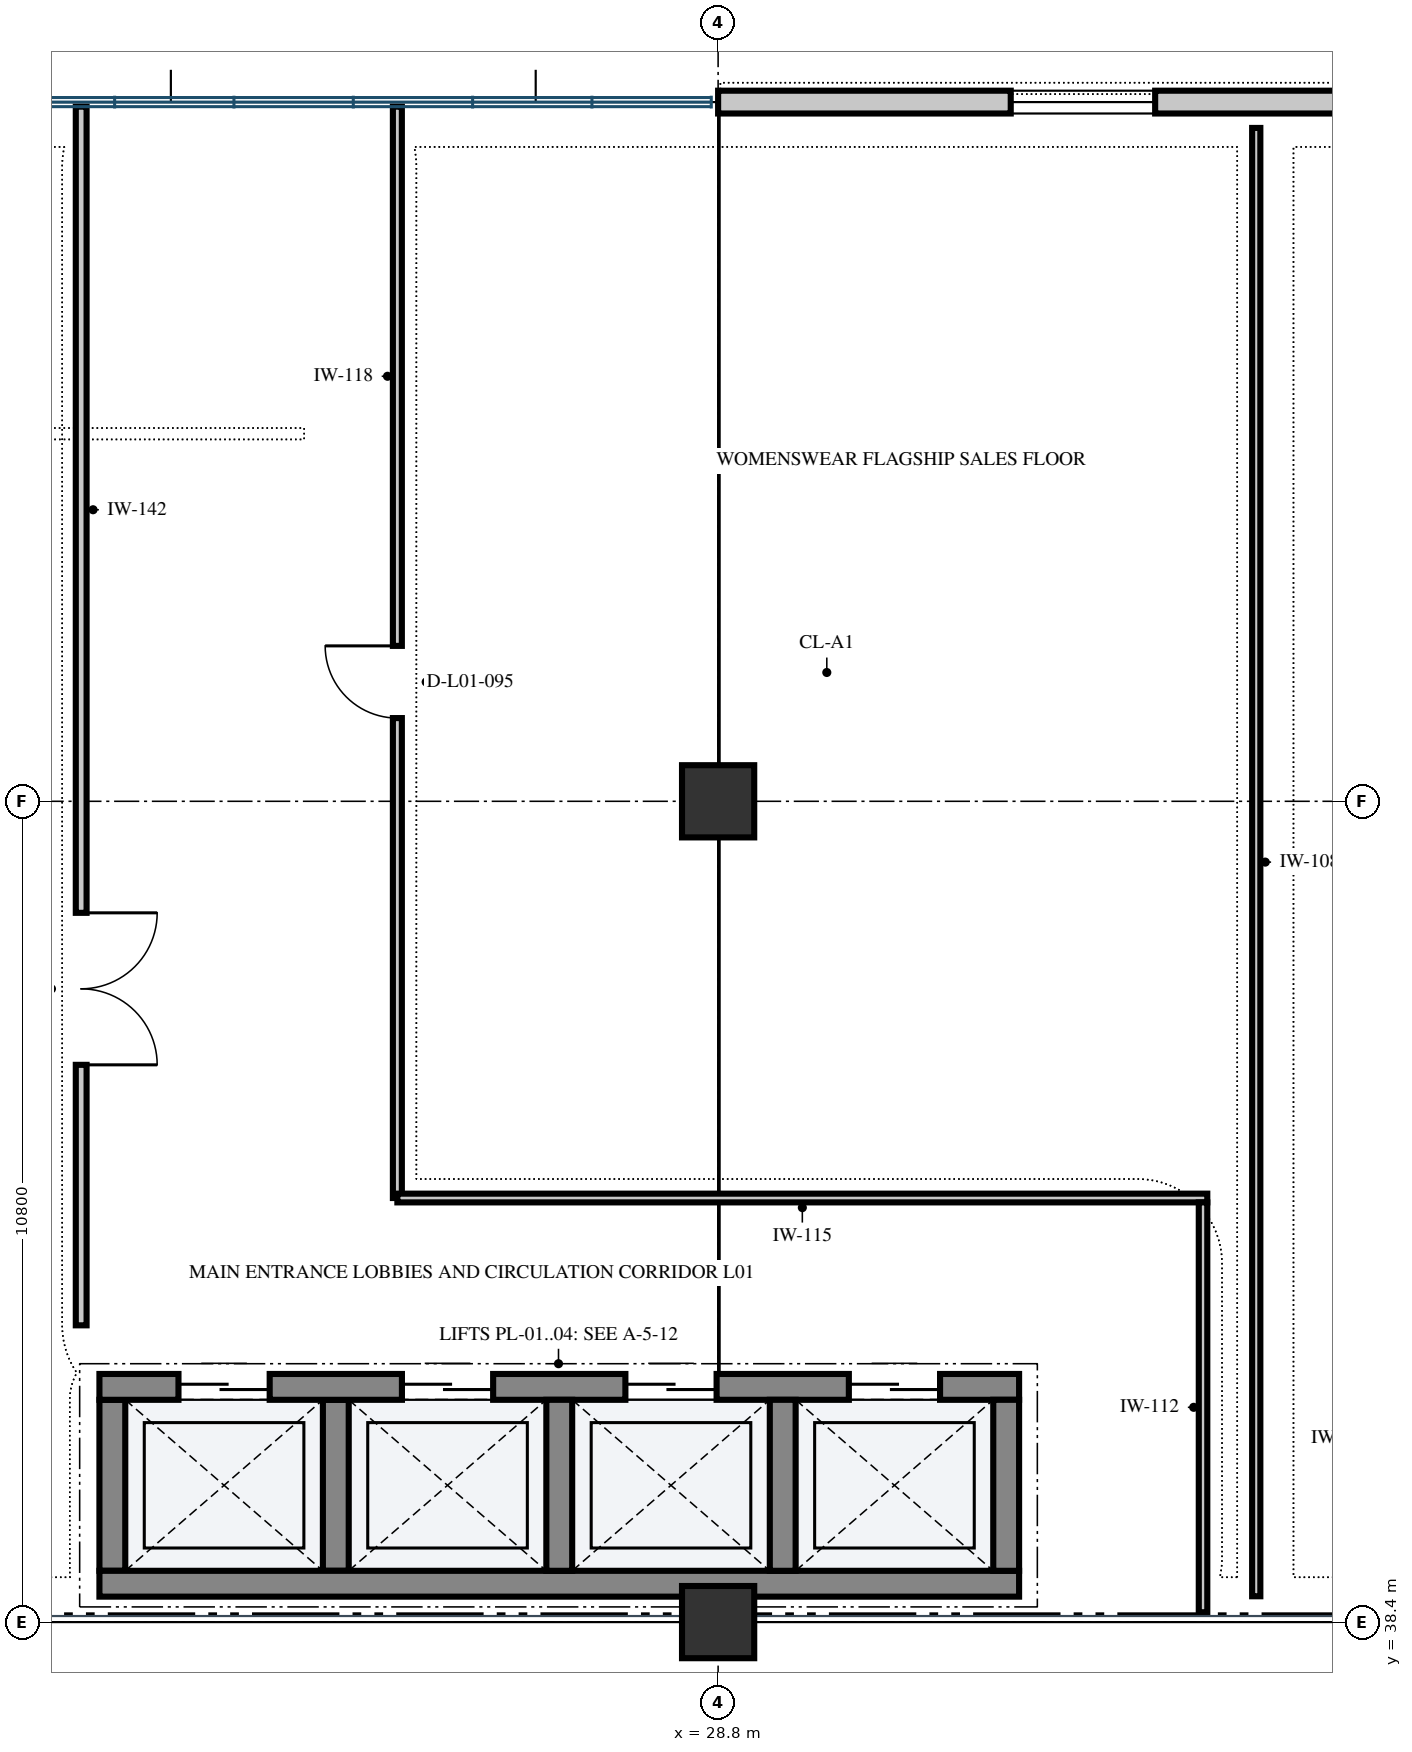
"""IFC4 building model, lengths in metres.
Left out: names, types, materials, properties, quantities, classifications, styles, units other than length and angle.
Written with IfcOpenShell. Run it as: python <this file> out.ifc"""

import sys

from ifc_helpers import new_model, si_unit, direction, frame, frame_2d, origin, origin_2d, place, context, subcontext, project, spatial, rectangle, extrude, element, fill, save


model = new_model("IFC4")
c1 = context("Model", 3, precision=1e-05, world=origin(), true_north=direction((0.0, 1.0)))
c2 = subcontext(c1, "Body", "Model", "MODEL_VIEW")
j1 = project(units=[si_unit("LENGTHUNIT", "METRE"), si_unit("PLANEANGLEUNIT", "RADIAN")], contexts=[c1])
p1 = place(None, origin())
s1 = spatial("IfcSite", under=j1, at=p1, CompositionType="ELEMENT")
p2 = place(p1, origin())
s2 = spatial("IfcBuilding", under=s1, at=p2, CompositionType="ELEMENT")
p3 = place(p2, frame((0.0, 0.0, 5.4)))
s3 = spatial("IfcBuildingStorey", under=s2, at=p3, CompositionType="ELEMENT", Elevation=5.4)
for number, where, z_axis, x_axis in (
    (1, (28.8, 38.4, 0.0), (0.0, 0.0, 1.0), (1.0, 0.0, 0.0)),
    (2, (28.8, 49.2, 0.0), (0.0, 0.0, 1.0), (1.0, 0.0, 0.0)),
):
    element("IfcColumn", number, at=place(p3, frame(where, z_axis=z_axis, x_axis=x_axis)), inside=s3, PredefinedType="COLUMN", context=c2, shape_type="SweptSolid", body=[
        extrude(rectangle(XDim=0.95, YDim=0.95, at=origin_2d()), origin(), (0.0, 0.0, 1.0), 4.8),
    ])
p4 = place(p3, frame((28.8, 58.4, 0.0), z_axis=(0.0, 0.0, 1.0), x_axis=(1.0, 0.0, 0.0)))
e3 = element("IfcWall", 3, at=p4, inside=s3, PredefinedType="SOLIDWALL", context=c2, shape_type="SweptSolid", body=[
    extrude(rectangle(XDim=9.6, YDim=0.3, at=frame_2d((4.8, 0.0))), origin(), (0.0, 0.0, 1.0), 3.445),
])
p5 = place(p4, frame((3.85, 0.0, 1.1)))
e4 = element("IfcOpeningElement", 4, at=p5, cuts=e3, PredefinedType="OPENING", context=c2, shape_type="SweptSolid", body=[
    extrude(rectangle(XDim=1.9, YDim=1.85, at=frame_2d((0.95, 0.925))), frame((0.0, 0.162, 0.0), z_axis=(0.0, -1.0, 0.0), x_axis=(1.0, 0.0, 0.0)), (0.0, 0.0, 1.0), 0.324),
])
for number, where, z_axis, x_axis in (
    (5, (23.77, 39.075, 0.0), (0.0, 0.0, 1.0), (0.0, 1.0, 0.0)),
    (6, (20.83, 39.075, 0.0), (0.0, 0.0, 1.0), (0.0, 1.0, 0.0)),
):
    element("IfcWall", number, at=place(p3, frame(where, z_axis=z_axis, x_axis=x_axis)), inside=s3, PredefinedType="SHEAR", context=c2, shape_type="SweptSolid", body=[
        extrude(rectangle(XDim=2.25, YDim=0.34, at=frame_2d((1.125, 0.0))), origin(), (0.0, 0.0, 1.0), 4.505),
    ])
p6 = place(p3, frame((20.66, 38.905, 0.0), z_axis=(0.0, 0.0, 1.0), x_axis=(1.0, 0.0, 0.0)))
e7 = element("IfcWall", 7, at=p6, inside=s3, PredefinedType="SHEAR", context=c2, shape_type="SweptSolid", body=[
    extrude(rectangle(XDim=12.1, YDim=0.34, at=frame_2d((6.05, 0.0))), origin(), (0.0, 0.0, 1.0), 4.505),
])
p7 = place(p3, frame((20.66, 41.495, 0.0), z_axis=(0.0, 0.0, 1.0), x_axis=(1.0, 0.0, 0.0)))
e8 = element("IfcWall", 8, at=p7, inside=s3, PredefinedType="SHEAR", context=c2, shape_type="SweptSolid", body=[
    extrude(rectangle(XDim=12.1, YDim=0.34, at=frame_2d((6.05, 0.0))), origin(), (0.0, 0.0, 1.0), 4.505),
])
p8 = place(p7, frame((1.04, 0.0, 0.0)))
e9 = element("IfcOpeningElement", 9, at=p8, cuts=e8, PredefinedType="OPENING", context=c2, shape_type="SweptSolid", body=[
    extrude(rectangle(XDim=1.2, YDim=2.2, at=frame_2d((0.6, 1.1))), frame((0.0, 0.182, 0.0), z_axis=(0.0, -1.0, 0.0), x_axis=(1.0, 0.0, 0.0)), (0.0, 0.0, 1.0), 0.364),
])
p9 = place(p7, frame((3.98, 0.0, 0.0)))
e10 = element("IfcOpeningElement", 10, at=p9, cuts=e8, PredefinedType="OPENING", context=c2, shape_type="SweptSolid", body=[
    extrude(rectangle(XDim=1.2, YDim=2.2, at=frame_2d((0.6, 1.1))), frame((0.0, 0.182, 0.0), z_axis=(0.0, -1.0, 0.0), x_axis=(1.0, 0.0, 0.0)), (0.0, 0.0, 1.0), 0.364),
])
p10 = place(p7, frame((6.92, 0.0, 0.0)))
e11 = element("IfcOpeningElement", 11, at=p10, cuts=e8, PredefinedType="OPENING", context=c2, shape_type="SweptSolid", body=[
    extrude(rectangle(XDim=1.2, YDim=2.2, at=frame_2d((0.6, 1.1))), frame((0.0, 0.182, 0.0), z_axis=(0.0, -1.0, 0.0), x_axis=(1.0, 0.0, 0.0)), (0.0, 0.0, 1.0), 0.364),
])
p11 = place(p7, frame((9.86, 0.0, 0.0)))
e12 = element("IfcOpeningElement", 12, at=p11, cuts=e8, PredefinedType="OPENING", context=c2, shape_type="SweptSolid", body=[
    extrude(rectangle(XDim=1.2, YDim=2.2, at=frame_2d((0.6, 1.1))), frame((0.0, 0.182, 0.0), z_axis=(0.0, -1.0, 0.0), x_axis=(1.0, 0.0, 0.0)), (0.0, 0.0, 1.0), 0.364),
])
for number, where, z_axis, x_axis in (
    (13, (26.71, 39.075, 0.0), (0.0, 0.0, 1.0), (0.0, 1.0, 0.0)),
    (14, (29.65, 39.075, 0.0), (0.0, 0.0, 1.0), (0.0, 1.0, 0.0)),
    (15, (32.59, 39.075, 0.0), (0.0, 0.0, 1.0), (0.0, 1.0, 0.0)),
):
    element("IfcWall", number, at=place(p3, frame(where, z_axis=z_axis, x_axis=x_axis)), inside=s3, PredefinedType="SHEAR", context=c2, shape_type="SweptSolid", body=[
        extrude(rectangle(XDim=2.25, YDim=0.34, at=frame_2d((1.125, 0.0))), origin(), (0.0, 0.0, 1.0), 4.505),
    ])
p12 = place(p3, frame((20.42, 58.34, 0.0), z_axis=(0.0, 0.0, 1.0), x_axis=(0.0, -1.0, 0.0)))
e16 = element("IfcWall", 16, at=p12, inside=s3, PredefinedType="PARTITIONING", context=c2, shape_type="SweptSolid", body=[
    extrude(rectangle(XDim=16.035, YDim=0.142, at=frame_2d((8.018, 0.0))), origin(), (0.0, 0.0, 1.0), 3.445),
])
p13 = place(p12, frame((10.607, 0.0, 0.0)))
e17 = element("IfcOpeningElement", 17, at=p13, cuts=e16, PredefinedType="OPENING", context=c2, shape_type="SweptSolid", body=[
    extrude(rectangle(XDim=2.0, YDim=2.4, at=frame_2d((1.0, 1.2))), frame((0.0, 0.083, 0.0), z_axis=(0.0, -1.0, 0.0), x_axis=(1.0, 0.0, 0.0)), (0.0, 0.0, 1.0), 0.166),
])
p14 = place(p3, frame((24.58, 43.98, 0.0), z_axis=(0.0, 0.0, 1.0), x_axis=(0.0, 1.0, 0.0)))
e18 = element("IfcWall", 18, at=p14, inside=s3, PredefinedType="PARTITIONING", context=c2, shape_type="SweptSolid", body=[
    extrude(rectangle(XDim=14.36, YDim=0.118, at=frame_2d((7.18, 0.0))), origin(), (0.0, 0.0, 1.0), 3.445),
])
p15 = place(p14, frame((6.315, 0.0, 0.0)))
e19 = element("IfcOpeningElement", 19, at=p15, cuts=e18, PredefinedType="OPENING", context=c2, shape_type="SweptSolid", body=[
    extrude(rectangle(XDim=0.95, YDim=2.1, at=frame_2d((0.475, 1.05))), frame((0.0, 0.071, 0.0), z_axis=(0.0, -1.0, 0.0), x_axis=(1.0, 0.0, 0.0)), (0.0, 0.0, 1.0), 0.142),
])
p16 = place(p3, frame((35.236, 43.98, 0.0), z_axis=(0.0, 0.0, 1.0), x_axis=(-1.0, 0.0, 0.0)))
e20 = element("IfcWall", 20, at=p16, inside=s3, PredefinedType="PARTITIONING", context=c2, shape_type="SweptSolid", body=[
    extrude(rectangle(XDim=10.656, YDim=0.115, at=frame_2d((5.328, 0.0))), origin(), (0.0, 0.0, 1.0), 4.505),
])
p17 = place(p3, frame((35.18, 38.53, 0.0), z_axis=(0.0, 0.0, 1.0), x_axis=(0.0, 1.0, 0.0)))
e21 = element("IfcWall", 21, at=p17, inside=s3, PredefinedType="PARTITIONING", context=c2, shape_type="SweptSolid", body=[
    extrude(rectangle(XDim=5.393, YDim=0.112, at=frame_2d((2.696, 0.0))), origin(), (0.0, 0.0, 1.0), 4.505),
])
p18 = place(p3, frame((35.88, 58.06, 0.0), z_axis=(0.0, 0.0, 1.0), x_axis=(0.0, -1.0, 0.0)))
e22 = element("IfcWall", 22, at=p18, inside=s3, PredefinedType="PARTITIONING", context=c2, shape_type="SweptSolid", body=[
    extrude(rectangle(XDim=19.32, YDim=0.108, at=frame_2d((9.66, 0.0))), origin(), (0.0, 0.0, 1.0), 3.445),
])
p19 = place(p5, origin())
e23 = element("IfcWindow", 23, at=p19, inside=s3, PartitioningType="SINGLE_PANEL", PredefinedType="WINDOW", context=c2, shape_type="SweptSolid", body=[
    extrude(rectangle(XDim=1.9, YDim=1.85, at=frame_2d((0.95, 0.925))), frame((0.0, 0.03, 0.0), z_axis=(0.0, -1.0, 0.0), x_axis=(1.0, 0.0, 0.0)), (0.0, 0.0, 1.0), 0.06),
])
fill(e4, e23)
p20 = place(p8, origin())
e24 = element("IfcDoor", 24, at=p20, inside=s3, OperationType="DOUBLE_DOOR_SLIDING", PredefinedType="DOOR", context=c2, shape_type="SweptSolid", body=[
    extrude(rectangle(XDim=1.2, YDim=2.2, at=frame_2d((0.6, 1.1))), frame((0.0, 0.025, 0.0), z_axis=(0.0, -1.0, 0.0), x_axis=(1.0, 0.0, 0.0)), (0.0, 0.0, 1.0), 0.05),
])
fill(e9, e24)
p21 = place(p9, origin())
e25 = element("IfcDoor", 25, at=p21, inside=s3, OperationType="DOUBLE_DOOR_SLIDING", PredefinedType="DOOR", context=c2, shape_type="SweptSolid", body=[
    extrude(rectangle(XDim=1.2, YDim=2.2, at=frame_2d((0.6, 1.1))), frame((0.0, 0.025, 0.0), z_axis=(0.0, -1.0, 0.0), x_axis=(1.0, 0.0, 0.0)), (0.0, 0.0, 1.0), 0.05),
])
fill(e10, e25)
p22 = place(p10, origin())
e26 = element("IfcDoor", 26, at=p22, inside=s3, OperationType="DOUBLE_DOOR_SLIDING", PredefinedType="DOOR", context=c2, shape_type="SweptSolid", body=[
    extrude(rectangle(XDim=1.2, YDim=2.2, at=frame_2d((0.6, 1.1))), frame((0.0, 0.025, 0.0), z_axis=(0.0, -1.0, 0.0), x_axis=(1.0, 0.0, 0.0)), (0.0, 0.0, 1.0), 0.05),
])
fill(e11, e26)
p23 = place(p11, origin())
e27 = element("IfcDoor", 27, at=p23, inside=s3, OperationType="DOUBLE_DOOR_SLIDING", PredefinedType="DOOR", context=c2, shape_type="SweptSolid", body=[
    extrude(rectangle(XDim=1.2, YDim=2.2, at=frame_2d((0.6, 1.1))), frame((0.0, 0.025, 0.0), z_axis=(0.0, -1.0, 0.0), x_axis=(1.0, 0.0, 0.0)), (0.0, 0.0, 1.0), 0.05),
])
fill(e12, e27)
p24 = place(p13, origin())
e28 = element("IfcDoor", 28, at=p24, inside=s3, OperationType="DOUBLE_DOOR_SINGLE_SWING", PredefinedType="DOOR", context=c2, shape_type="SweptSolid", body=[
    extrude(rectangle(XDim=2.0, YDim=2.4, at=frame_2d((1.0, 1.2))), frame((0.0, 0.025, 0.0), z_axis=(0.0, -1.0, 0.0), x_axis=(1.0, 0.0, 0.0)), (0.0, 0.0, 1.0), 0.05),
])
fill(e17, e28)
p25 = place(p15, origin())
e29 = element("IfcDoor", 29, at=p25, inside=s3, OperationType="SINGLE_SWING_RIGHT", PredefinedType="DOOR", context=c2, shape_type="SweptSolid", body=[
    extrude(rectangle(XDim=0.95, YDim=2.1, at=frame_2d((0.475, 1.05))), frame((0.0, 0.025, 0.0), z_axis=(0.0, -1.0, 0.0), x_axis=(1.0, 0.0, 0.0)), (0.0, 0.0, 1.0), 0.05),
])
fill(e19, e29)
save(model, sys.argv[1])
